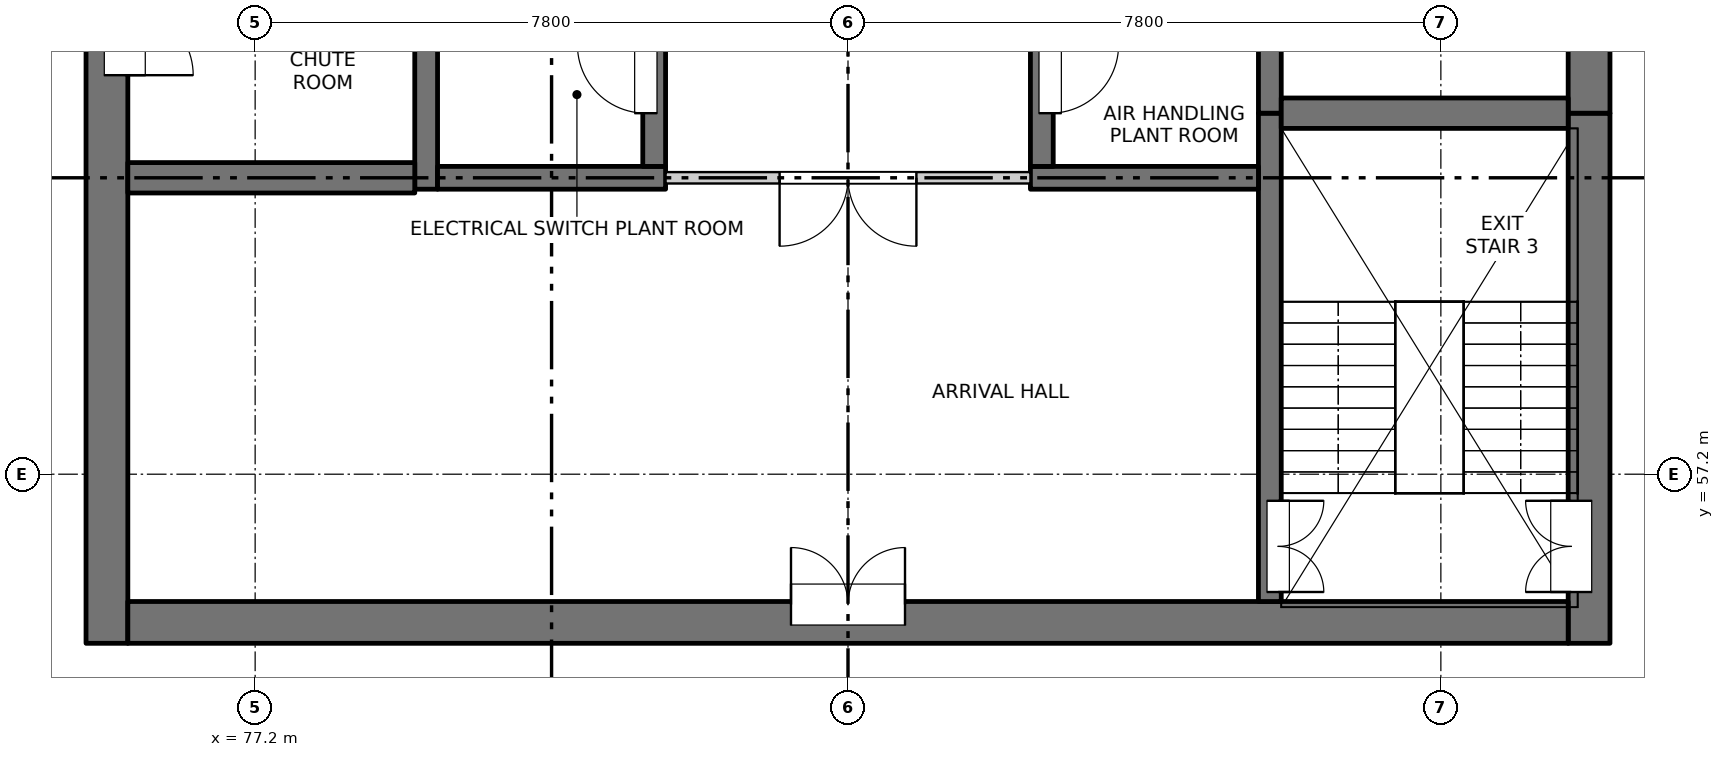
"""IFC4 building model, lengths in metres.
Left out: names, types, materials, properties, quantities, classifications, styles, units other than length and angle.
Written with IfcOpenShell. Run it as: python <this file> out.ifc"""

import sys

from ifc_helpers import new_model, si_unit, direction, frame, frame_2d, origin, place, context, subcontext, project, spatial, rectangle, extrude, element, fill, save


model = new_model("IFC4")
c1 = context("Model", 3, precision=1e-05, world=origin(), true_north=direction((0.0, 1.0)))
c2 = subcontext(c1, "Body", "Model", "MODEL_VIEW")
j1 = project(units=[si_unit("LENGTHUNIT", "METRE"), si_unit("PLANEANGLEUNIT", "RADIAN")], contexts=[c1])
p1 = place(None, origin())
s1 = spatial("IfcSite", under=j1, at=p1, CompositionType="ELEMENT")
p2 = place(p1, origin())
s2 = spatial("IfcBuilding", under=s1, at=p2, CompositionType="ELEMENT")
p3 = place(p2, frame((0.0, 0.0, 172.4)))
s3 = spatial("IfcBuildingStorey", under=s2, at=p3, CompositionType="ELEMENT", Elevation=172.4)
p4 = place(p3, frame((75.25, 54.975, -0.3), z_axis=(0.0, 0.0, 1.0), x_axis=(0.0, 1.0, 0.0)))
e1 = element("IfcWall", 1, at=p4, inside=s3, PredefinedType="SOLIDWALL", context=c2, shape_type="SweptSolid", body=[
    extrude(rectangle(XDim=22.325, YDim=0.55, at=frame_2d((11.163, 0.0))), origin(), (0.0, 0.0, 1.0), 6.8),
])
p5 = place(p4, frame((7.475, 0.0, 0.3)))
e2 = element("IfcOpeningElement", 2, at=p5, cuts=e1, PredefinedType="OPENING", context=c2, shape_type="SweptSolid", body=[
    extrude(rectangle(XDim=0.9, YDim=2.1, at=frame_2d((0.45, 1.05))), frame((0.0, 0.285, 0.0), z_axis=(0.0, -1.0, 0.0), x_axis=(1.0, 0.0, 0.0)), (0.0, 0.0, 1.0), 0.57),
])
p6 = place(p4, frame((10.775, 0.0, 0.3)))
e3 = element("IfcOpeningElement", 3, at=p6, cuts=e1, PredefinedType="OPENING", context=c2, shape_type="SweptSolid", body=[
    extrude(rectangle(XDim=0.9, YDim=2.1, at=frame_2d((0.45, 1.05))), frame((0.0, 0.285, 0.0), z_axis=(0.0, -1.0, 0.0), x_axis=(1.0, 0.0, 0.0)), (0.0, 0.0, 1.0), 0.57),
])
p7 = place(p4, frame((13.775, 0.0, 0.3)))
e4 = element("IfcOpeningElement", 4, at=p7, cuts=e1, PredefinedType="OPENING", context=c2, shape_type="SweptSolid", body=[
    extrude(rectangle(XDim=0.9, YDim=2.1, at=frame_2d((0.45, 1.05))), frame((0.0, 0.285, 0.0), z_axis=(0.0, -1.0, 0.0), x_axis=(1.0, 0.0, 0.0)), (0.0, 0.0, 1.0), 0.57),
])
p8 = place(p4, frame((16.775, 0.0, 0.3)))
e5 = element("IfcOpeningElement", 5, at=p8, cuts=e1, PredefinedType="OPENING", context=c2, shape_type="SweptSolid", body=[
    extrude(rectangle(XDim=0.9, YDim=2.1, at=frame_2d((0.45, 1.05))), frame((0.0, 0.285, 0.0), z_axis=(0.0, -1.0, 0.0), x_axis=(1.0, 0.0, 0.0)), (0.0, 0.0, 1.0), 0.57),
])
p9 = place(p4, frame((20.075, 0.0, 0.3)))
e6 = element("IfcOpeningElement", 6, at=p9, cuts=e1, PredefinedType="OPENING", context=c2, shape_type="SweptSolid", body=[
    extrude(rectangle(XDim=0.9, YDim=2.1, at=frame_2d((0.45, 1.05))), frame((0.0, 0.285, 0.0), z_axis=(0.0, -1.0, 0.0), x_axis=(1.0, 0.0, 0.0)), (0.0, 0.0, 1.0), 0.57),
])
p10 = place(p3, frame((94.75, 54.975, -0.3), z_axis=(0.0, 0.0, 1.0), x_axis=(0.0, 1.0, 0.0)))
e7 = element("IfcWall", 7, at=p10, inside=s3, PredefinedType="SOLIDWALL", context=c2, shape_type="SweptSolid", body=[
    extrude(rectangle(XDim=6.975, YDim=0.55, at=frame_2d((3.487, 0.0))), origin(), (0.0, 0.0, 1.0), 6.8),
])
p11 = place(p10, frame((0.675, 0.0, 0.3)))
e8 = element("IfcOpeningElement", 8, at=p11, cuts=e7, PredefinedType="OPENING", context=c2, shape_type="SweptSolid", body=[
    extrude(rectangle(XDim=1.2, YDim=2.1, at=frame_2d((0.6, 1.05))), frame((0.0, 0.285, 0.0), z_axis=(0.0, -1.0, 0.0), x_axis=(1.0, 0.0, 0.0)), (0.0, 0.0, 1.0), 0.57),
])
p12 = place(p3, frame((94.75, 61.95, -0.3), z_axis=(0.0, 0.0, 1.0), x_axis=(0.0, 1.0, 0.0)))
e9 = element("IfcWall", 9, at=p12, inside=s3, PredefinedType="SOLIDWALL", context=c2, shape_type="SweptSolid", body=[
    extrude(rectangle(XDim=15.35, YDim=0.55, at=frame_2d((7.675, 0.0))), origin(), (0.0, 0.0, 1.0), 6.8),
])
p13 = place(p12, frame((0.925, 0.0, 0.3)))
e10 = element("IfcOpeningElement", 10, at=p13, cuts=e9, PredefinedType="OPENING", context=c2, shape_type="SweptSolid", body=[
    extrude(rectangle(XDim=0.9, YDim=2.1, at=frame_2d((0.45, 1.05))), frame((0.0, 0.285, 0.0), z_axis=(0.0, -1.0, 0.0), x_axis=(1.0, 0.0, 0.0)), (0.0, 0.0, 1.0), 0.57),
])
p14 = place(p12, frame((3.8, 0.0, 0.3)))
e11 = element("IfcOpeningElement", 11, at=p14, cuts=e9, PredefinedType="OPENING", context=c2, shape_type="SweptSolid", body=[
    extrude(rectangle(XDim=0.9, YDim=2.1, at=frame_2d((0.45, 1.05))), frame((0.0, 0.285, 0.0), z_axis=(0.0, -1.0, 0.0), x_axis=(1.0, 0.0, 0.0)), (0.0, 0.0, 1.0), 0.57),
])
p15 = place(p12, frame((6.8, 0.0, 0.3)))
e12 = element("IfcOpeningElement", 12, at=p15, cuts=e9, PredefinedType="OPENING", context=c2, shape_type="SweptSolid", body=[
    extrude(rectangle(XDim=0.9, YDim=2.1, at=frame_2d((0.45, 1.05))), frame((0.0, 0.285, 0.0), z_axis=(0.0, -1.0, 0.0), x_axis=(1.0, 0.0, 0.0)), (0.0, 0.0, 1.0), 0.57),
])
p16 = place(p12, frame((9.8, 0.0, 0.3)))
e13 = element("IfcOpeningElement", 13, at=p16, cuts=e9, PredefinedType="OPENING", context=c2, shape_type="SweptSolid", body=[
    extrude(rectangle(XDim=0.9, YDim=2.1, at=frame_2d((0.45, 1.05))), frame((0.0, 0.285, 0.0), z_axis=(0.0, -1.0, 0.0), x_axis=(1.0, 0.0, 0.0)), (0.0, 0.0, 1.0), 0.57),
])
p17 = place(p12, frame((13.1, 0.0, 0.3)))
e14 = element("IfcOpeningElement", 14, at=p17, cuts=e9, PredefinedType="OPENING", context=c2, shape_type="SweptSolid", body=[
    extrude(rectangle(XDim=0.9, YDim=2.1, at=frame_2d((0.45, 1.05))), frame((0.0, 0.285, 0.0), z_axis=(0.0, -1.0, 0.0), x_axis=(1.0, 0.0, 0.0)), (0.0, 0.0, 1.0), 0.57),
])
p18 = place(p3, frame((75.525, 55.25, -0.3), z_axis=(0.0, 0.0, 1.0), x_axis=(1.0, 0.0, 0.0)))
e15 = element("IfcWall", 15, at=p18, inside=s3, PredefinedType="SOLIDWALL", context=c2, shape_type="SweptSolid", body=[
    extrude(rectangle(XDim=18.95, YDim=0.55, at=frame_2d((9.475, 0.0))), origin(), (0.0, 0.0, 1.0), 6.8),
])
p19 = place(p18, frame((8.725, 0.0, 0.3)))
e16 = element("IfcOpeningElement", 16, at=p19, cuts=e15, PredefinedType="OPENING", context=c2, shape_type="SweptSolid", body=[
    extrude(rectangle(XDim=1.5, YDim=2.1, at=frame_2d((0.75, 1.05))), frame((0.0, 0.285, 0.0), z_axis=(0.0, -1.0, 0.0), x_axis=(1.0, 0.0, 0.0)), (0.0, 0.0, 1.0), 0.57),
])
p20 = place(p3, frame((79.45, 60.95, -0.3), z_axis=(0.0, 0.0, 1.0), x_axis=(0.0, 1.0, 0.0)))
e17 = element("IfcWall", 17, at=p20, inside=s3, PredefinedType="SOLIDWALL", context=c2, shape_type="SweptSolid", body=[
    extrude(rectangle(XDim=16.35, YDim=0.3, at=frame_2d((8.175, 0.0))), origin(), (0.0, 0.0, 1.0), 6.8),
])
p21 = place(p3, frame((90.55, 55.525, -0.3), z_axis=(0.0, 0.0, 1.0), x_axis=(0.0, 1.0, 0.0)))
e18 = element("IfcWall", 18, at=p21, inside=s3, PredefinedType="SOLIDWALL", context=c2, shape_type="SweptSolid", body=[
    extrude(rectangle(XDim=6.425, YDim=0.3, at=frame_2d((3.212, 0.0))), origin(), (0.0, 0.0, 1.0), 6.8),
])
p22 = place(p21, frame((0.125, 0.0, 0.3)))
e19 = element("IfcOpeningElement", 19, at=p22, cuts=e18, PredefinedType="OPENING", context=c2, shape_type="SweptSolid", body=[
    extrude(rectangle(XDim=1.2, YDim=2.1, at=frame_2d((0.6, 1.05))), frame((0.0, 0.16, 0.0), z_axis=(0.0, -1.0, 0.0), x_axis=(1.0, 0.0, 0.0)), (0.0, 0.0, 1.0), 0.32),
])
p23 = place(p3, frame((90.55, 61.95, -0.3), z_axis=(0.0, 0.0, 1.0), x_axis=(0.0, 1.0, 0.0)))
e20 = element("IfcWall", 20, at=p23, inside=s3, PredefinedType="SOLIDWALL", context=c2, shape_type="SweptSolid", body=[
    extrude(rectangle(XDim=15.35, YDim=0.3, at=frame_2d((7.675, 0.0))), origin(), (0.0, 0.0, 1.0), 6.8),
])
p24 = place(p3, frame((79.6, 61.1, -0.3), z_axis=(0.0, 0.0, 1.0), x_axis=(1.0, 0.0, 0.0)))
e21 = element("IfcWall", 21, at=p24, inside=s3, PredefinedType="SOLIDWALL", context=c2, shape_type="SweptSolid", body=[
    extrude(rectangle(XDim=3.0, YDim=0.3, at=frame_2d((1.5, 0.0))), origin(), (0.0, 0.0, 1.0), 6.8),
])
p25 = place(p3, frame((82.45, 61.25, -0.3), z_axis=(0.0, 0.0, 1.0), x_axis=(0.0, 1.0, 0.0)))
e22 = element("IfcWall", 22, at=p25, inside=s3, PredefinedType="SOLIDWALL", context=c2, shape_type="SweptSolid", body=[
    extrude(rectangle(XDim=2.3, YDim=0.3, at=frame_2d((1.15, 0.0))), origin(), (0.0, 0.0, 1.0), 6.8),
])
p26 = place(p25, frame((0.7, 0.0, 0.3)))
e23 = element("IfcOpeningElement", 23, at=p26, cuts=e22, PredefinedType="OPENING", context=c2, shape_type="SweptSolid", body=[
    extrude(rectangle(XDim=0.9, YDim=2.1, at=frame_2d((0.45, 1.05))), frame((0.0, 0.16, 0.0), z_axis=(0.0, -1.0, 0.0), x_axis=(1.0, 0.0, 0.0)), (0.0, 0.0, 1.0), 0.32),
])
p27 = place(p3, frame((87.4, 61.1, -0.3), z_axis=(0.0, 0.0, 1.0), x_axis=(1.0, 0.0, 0.0)))
e24 = element("IfcWall", 24, at=p27, inside=s3, PredefinedType="SOLIDWALL", context=c2, shape_type="SweptSolid", body=[
    extrude(rectangle(XDim=3.0, YDim=0.3, at=frame_2d((1.5, 0.0))), origin(), (0.0, 0.0, 1.0), 6.8),
])
p28 = place(p3, frame((87.55, 61.25, -0.3), z_axis=(0.0, 0.0, 1.0), x_axis=(0.0, 1.0, 0.0)))
e25 = element("IfcWall", 25, at=p28, inside=s3, PredefinedType="SOLIDWALL", context=c2, shape_type="SweptSolid", body=[
    extrude(rectangle(XDim=2.3, YDim=0.3, at=frame_2d((1.15, 0.0))), origin(), (0.0, 0.0, 1.0), 6.8),
])
p29 = place(p28, frame((0.7, 0.0, 0.3)))
e26 = element("IfcOpeningElement", 26, at=p29, cuts=e25, PredefinedType="OPENING", context=c2, shape_type="SweptSolid", body=[
    extrude(rectangle(XDim=0.9, YDim=2.1, at=frame_2d((0.45, 1.05))), frame((0.0, 0.16, 0.0), z_axis=(0.0, -1.0, 0.0), x_axis=(1.0, 0.0, 0.0)), (0.0, 0.0, 1.0), 0.32),
])
for number, where, z_axis, x_axis in (
    (27, (75.525, 61.1, -0.3), (0.0, 0.0, 1.0), (1.0, 0.0, 0.0)),
    (28, (90.7, 61.95, -0.3), (0.0, 0.0, 1.0), (1.0, 0.0, 0.0)),
):
    element("IfcWall", number, at=place(p3, frame(where, z_axis=z_axis, x_axis=x_axis)), inside=s3, PredefinedType="SOLIDWALL", context=c2, shape_type="SweptSolid", body=[
        extrude(rectangle(XDim=3.775, YDim=0.4, at=frame_2d((1.888, 0.0))), origin(), (0.0, 0.0, 1.0), 6.8),
    ])
p30 = place(p3, frame((82.6, 61.1, 0.0), z_axis=(0.0, 0.0, 1.0), x_axis=(1.0, 0.0, 0.0)))
e29 = element("IfcWall", 29, at=p30, inside=s3, PredefinedType="PARTITIONING", context=c2, shape_type="SweptSolid", body=[
    extrude(rectangle(XDim=4.8, YDim=0.15, at=frame_2d((2.4, 0.0))), origin(), (0.0, 0.0, 1.0), 6.5),
])
p31 = place(p30, frame((1.5, 0.0, 0.0)))
e30 = element("IfcOpeningElement", 30, at=p31, cuts=e29, PredefinedType="OPENING", context=c2, shape_type="SweptSolid", body=[
    extrude(rectangle(XDim=1.8, YDim=2.1, at=frame_2d((0.9, 1.05))), frame((0.0, 0.085, 0.0), z_axis=(0.0, -1.0, 0.0), x_axis=(1.0, 0.0, 0.0)), (0.0, 0.0, 1.0), 0.17),
])
p32 = place(p19, origin())
e31 = element("IfcDoor", 31, at=p32, inside=s3, OperationType="DOUBLE_DOOR_SINGLE_SWING", PredefinedType="DOOR", context=c2, shape_type="SweptSolid", body=[
    extrude(rectangle(XDim=1.5, YDim=2.1, at=frame_2d((0.75, 1.05))), frame((0.0, 0.26, 0.0), z_axis=(0.0, -1.0, 0.0), x_axis=(1.0, 0.0, 0.0)), (0.0, 0.0, 1.0), 0.05),
])
fill(e16, e31)
p33 = place(p22, origin())
e32 = element("IfcDoor", 32, at=p33, inside=s3, OperationType="DOUBLE_DOOR_SINGLE_SWING", PredefinedType="DOOR", context=c2, shape_type="SweptSolid", body=[
    extrude(rectangle(XDim=1.2, YDim=2.1, at=frame_2d((0.6, 1.05))), frame((0.0, -0.085, 0.0), z_axis=(0.0, -1.0, 0.0), x_axis=(1.0, 0.0, 0.0)), (0.0, 0.0, 1.0), 0.05),
])
fill(e19, e32)
p34 = place(p11, origin())
e33 = element("IfcDoor", 33, at=p34, inside=s3, OperationType="DOUBLE_DOOR_SINGLE_SWING", PredefinedType="DOOR", context=c2, shape_type="SweptSolid", body=[
    extrude(rectangle(XDim=1.2, YDim=2.1, at=frame_2d((0.6, 1.05))), frame((0.0, 0.26, 0.0), z_axis=(0.0, -1.0, 0.0), x_axis=(1.0, 0.0, 0.0)), (0.0, 0.0, 1.0), 0.05),
])
fill(e8, e33)
p35 = place(p31, origin())
e34 = element("IfcDoor", 34, at=p35, inside=s3, OperationType="DOUBLE_DOOR_SINGLE_SWING", PredefinedType="DOOR", context=c2, shape_type="SweptSolid", body=[
    extrude(rectangle(XDim=1.8, YDim=2.1, at=frame_2d((0.9, 1.05))), frame((0.0, 0.025, 0.0), z_axis=(0.0, -1.0, 0.0), x_axis=(1.0, 0.0, 0.0)), (0.0, 0.0, 1.0), 0.05),
])
fill(e30, e34)
p36 = place(p26, origin())
e35 = element("IfcDoor", 35, at=p36, inside=s3, OperationType="SINGLE_SWING_RIGHT", PredefinedType="DOOR", context=c2, shape_type="SweptSolid", body=[
    extrude(rectangle(XDim=0.9, YDim=2.1, at=frame_2d((0.45, 1.05))), frame((0.0, 0.135, 0.0), z_axis=(0.0, -1.0, 0.0), x_axis=(1.0, 0.0, 0.0)), (0.0, 0.0, 1.0), 0.05),
])
fill(e23, e35)
p37 = place(p29, origin())
e36 = element("IfcDoor", 36, at=p37, inside=s3, OperationType="SINGLE_SWING_LEFT", PredefinedType="DOOR", context=c2, shape_type="SweptSolid", body=[
    extrude(rectangle(XDim=0.9, YDim=2.1, at=frame_2d((0.45, 1.05))), frame((0.0, -0.085, 0.0), z_axis=(0.0, -1.0, 0.0), x_axis=(1.0, 0.0, 0.0)), (0.0, 0.0, 1.0), 0.05),
])
fill(e26, e36)
p38 = place(p5, origin())
e37 = element("IfcDoor", 37, at=p38, inside=s3, OperationType="SINGLE_SWING_RIGHT", PredefinedType="DOOR", context=c2, shape_type="SweptSolid", body=[
    extrude(rectangle(XDim=0.9, YDim=2.1, at=frame_2d((0.45, 1.05))), frame((0.0, -0.21, 0.0), z_axis=(0.0, -1.0, 0.0), x_axis=(1.0, 0.0, 0.0)), (0.0, 0.0, 1.0), 0.05),
])
fill(e2, e37)
save(model, sys.argv[1])
